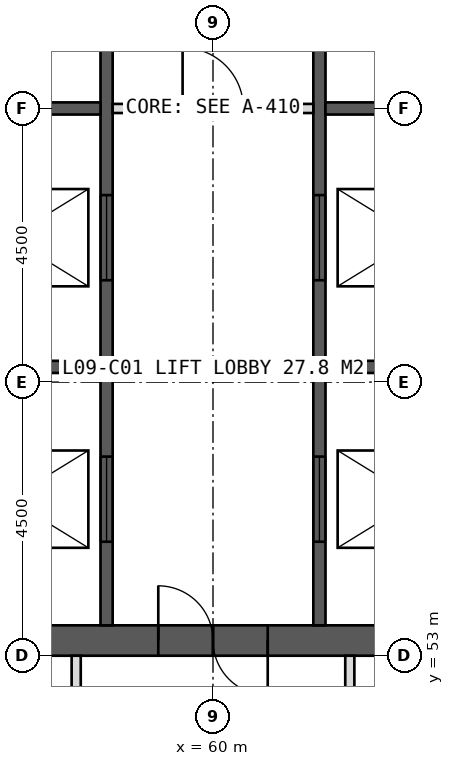
"""IFC4 building model, lengths in metres.
Left out: names, types, materials, properties, quantities, classifications, styles, units other than length and angle.
Written with IfcOpenShell. Run it as: python <this file> out.ifc"""

import sys

from ifc_helpers import new_model, si_unit, direction, frame, frame_2d, origin, place, context, subcontext, project, spatial, rectangle, extrude, element, fill, save


model = new_model("IFC4")
c1 = context("Model", 3, precision=1e-05, world=origin(), true_north=direction((0.0, 1.0)))
c2 = subcontext(c1, "Body", "Model", "MODEL_VIEW")
j1 = project(units=[si_unit("LENGTHUNIT", "METRE"), si_unit("PLANEANGLEUNIT", "RADIAN")], contexts=[c1])
p1 = place(None, origin())
s1 = spatial("IfcSite", under=j1, at=p1, CompositionType="ELEMENT")
p2 = place(p1, origin())
s2 = spatial("IfcBuilding", under=s1, at=p2, CompositionType="ELEMENT")
p3 = place(p2, frame((0.0, 0.0, 43.0)))
s3 = spatial("IfcBuildingStorey", under=s2, at=p3, CompositionType="ELEMENT", Elevation=43.0)
p4 = place(p3, frame((51.0, 53.25, 0.0), z_axis=(0.0, 0.0, 1.0), x_axis=(1.0, 0.0, 0.0)))
e1 = element("IfcWall", 1, at=p4, inside=s3, PredefinedType="SHEAR", context=c2, shape_type="SweptSolid", body=[
    extrude(rectangle(XDim=18.0, YDim=0.5, at=frame_2d((9.0, 0.0))), origin(), (0.0, 0.0, 1.0), 4.0),
])
p5 = place(p4, frame((8.1, 0.0, 0.0)))
e2 = element("IfcOpeningElement", 2, at=p5, cuts=e1, PredefinedType="OPENING", context=c2, shape_type="SweptSolid", body=[
    extrude(rectangle(XDim=1.8, YDim=2.2, at=frame_2d((0.9, 1.1))), frame((0.0, 0.26, 0.0), z_axis=(0.0, -1.0, 0.0), x_axis=(1.0, 0.0, 0.0)), (0.0, 0.0, 1.0), 0.52),
])
p6 = place(p3, frame((58.25, 53.5, 0.0), z_axis=(0.0, 0.0, 1.0), x_axis=(0.0, 1.0, 0.0)))
e3 = element("IfcWall", 3, at=p6, inside=s3, PredefinedType="SHEAR", context=c2, shape_type="SweptSolid", body=[
    extrude(rectangle(XDim=17.0, YDim=0.2, at=frame_2d((8.5, 0.0))), origin(), (0.0, 0.0, 1.0), 4.0),
])
p7 = place(p6, frame((1.375, 0.0, 0.0)))
e4 = element("IfcOpeningElement", 4, at=p7, cuts=e3, PredefinedType="OPENING", context=c2, shape_type="SweptSolid", body=[
    extrude(rectangle(XDim=1.4, YDim=2.2, at=frame_2d((0.7, 1.1))), frame((0.0, 0.11, 0.0), z_axis=(0.0, -1.0, 0.0), x_axis=(1.0, 0.0, 0.0)), (0.0, 0.0, 1.0), 0.22),
])
p8 = place(p6, frame((5.675, 0.0, 0.0)))
e5 = element("IfcOpeningElement", 5, at=p8, cuts=e3, PredefinedType="OPENING", context=c2, shape_type="SweptSolid", body=[
    extrude(rectangle(XDim=1.4, YDim=2.2, at=frame_2d((0.7, 1.1))), frame((0.0, 0.11, 0.0), z_axis=(0.0, -1.0, 0.0), x_axis=(1.0, 0.0, 0.0)), (0.0, 0.0, 1.0), 0.22),
])
p9 = place(p3, frame((61.75, 53.5, 0.0), z_axis=(0.0, 0.0, 1.0), x_axis=(0.0, 1.0, 0.0)))
e6 = element("IfcWall", 6, at=p9, inside=s3, PredefinedType="SHEAR", context=c2, shape_type="SweptSolid", body=[
    extrude(rectangle(XDim=17.0, YDim=0.2, at=frame_2d((8.5, 0.0))), origin(), (0.0, 0.0, 1.0), 4.0),
])
p10 = place(p9, frame((1.375, 0.0, 0.0)))
e7 = element("IfcOpeningElement", 7, at=p10, cuts=e6, PredefinedType="OPENING", context=c2, shape_type="SweptSolid", body=[
    extrude(rectangle(XDim=1.4, YDim=2.2, at=frame_2d((0.7, 1.1))), frame((0.0, 0.11, 0.0), z_axis=(0.0, -1.0, 0.0), x_axis=(1.0, 0.0, 0.0)), (0.0, 0.0, 1.0), 0.22),
])
p11 = place(p9, frame((5.675, 0.0, 0.0)))
e8 = element("IfcOpeningElement", 8, at=p11, cuts=e6, PredefinedType="OPENING", context=c2, shape_type="SweptSolid", body=[
    extrude(rectangle(XDim=1.4, YDim=2.2, at=frame_2d((0.7, 1.1))), frame((0.0, 0.11, 0.0), z_axis=(0.0, -1.0, 0.0), x_axis=(1.0, 0.0, 0.0)), (0.0, 0.0, 1.0), 0.22),
])
for number, where, z_axis, x_axis in (
    (9, (55.1, 57.75, 0.0), (0.0, 0.0, 1.0), (1.0, 0.0, 0.0)),
    (10, (61.85, 57.75, 0.0), (0.0, 0.0, 1.0), (1.0, 0.0, 0.0)),
    (11, (55.1, 62.0, 0.0), (0.0, 0.0, 1.0), (1.0, 0.0, 0.0)),
    (12, (61.85, 62.0, 0.0), (0.0, 0.0, 1.0), (1.0, 0.0, 0.0)),
):
    element("IfcWall", number, at=place(p3, frame(where, z_axis=z_axis, x_axis=x_axis)), inside=s3, PredefinedType="SHEAR", context=c2, shape_type="SweptSolid", body=[
        extrude(rectangle(XDim=3.05, YDim=0.2, at=frame_2d((1.525, 0.0))), origin(), (0.0, 0.0, 1.0), 4.0),
    ])
for number, where, z_axis, x_axis in (
    (13, (62.25, 53.0, 0.0), (0.0, 0.0, 1.0), (0.0, -1.0, 0.0)),
    (14, (57.75, 53.0, 0.0), (0.0, 0.0, 1.0), (0.0, -1.0, 0.0)),
):
    element("IfcWall", number, at=place(p3, frame(where, z_axis=z_axis, x_axis=x_axis)), inside=s3, PredefinedType="PARTITIONING", context=c2, shape_type="SweptSolid", body=[
        extrude(rectangle(XDim=6.6, YDim=0.15, at=frame_2d((3.3, 0.0))), origin(), (0.0, 0.0, 1.0), 3.75),
    ])
p12 = place(p3, frame((58.35, 62.0, 0.0), z_axis=(0.0, 0.0, 1.0), x_axis=(1.0, 0.0, 0.0)))
e15 = element("IfcWall", 15, at=p12, inside=s3, PredefinedType="PARTITIONING", context=c2, shape_type="SweptSolid", body=[
    extrude(rectangle(XDim=3.3, YDim=0.15, at=frame_2d((1.65, 0.0))), origin(), (0.0, 0.0, 1.0), 3.75),
])
p13 = place(p12, frame((1.15, 0.0, 0.0)))
e16 = element("IfcOpeningElement", 16, at=p13, cuts=e15, PredefinedType="OPENING", context=c2, shape_type="SweptSolid", body=[
    extrude(rectangle(XDim=1.0, YDim=2.1, at=frame_2d((0.5, 1.05))), frame((0.0, 0.085, 0.0), z_axis=(0.0, -1.0, 0.0), x_axis=(1.0, 0.0, 0.0)), (0.0, 0.0, 1.0), 0.17),
])
p14 = place(p5, origin())
e17 = element("IfcDoor", 17, at=p14, inside=s3, OperationType="DOUBLE_DOOR_SINGLE_SWING", PredefinedType="DOOR", context=c2, shape_type="SweptSolid", body=[
    extrude(rectangle(XDim=1.8, YDim=2.2, at=frame_2d((0.9, 1.1))), frame((0.0, 0.025, 0.0), z_axis=(0.0, -1.0, 0.0), x_axis=(1.0, 0.0, 0.0)), (0.0, 0.0, 1.0), 0.05),
])
fill(e2, e17)
p15 = place(p7, origin())
e18 = element("IfcDoor", 18, at=p15, inside=s3, OperationType="SLIDING_TO_LEFT", PredefinedType="DOOR", context=c2, shape_type="SweptSolid", body=[
    extrude(rectangle(XDim=1.4, YDim=2.2, at=frame_2d((0.7, 1.1))), frame((0.0, 0.025, 0.0), z_axis=(0.0, -1.0, 0.0), x_axis=(1.0, 0.0, 0.0)), (0.0, 0.0, 1.0), 0.05),
])
fill(e4, e18)
p16 = place(p10, origin())
e19 = element("IfcDoor", 19, at=p16, inside=s3, OperationType="SLIDING_TO_LEFT", PredefinedType="DOOR", context=c2, shape_type="SweptSolid", body=[
    extrude(rectangle(XDim=1.4, YDim=2.2, at=frame_2d((0.7, 1.1))), frame((0.0, 0.025, 0.0), z_axis=(0.0, -1.0, 0.0), x_axis=(1.0, 0.0, 0.0)), (0.0, 0.0, 1.0), 0.05),
])
fill(e7, e19)
p17 = place(p8, origin())
e20 = element("IfcDoor", 20, at=p17, inside=s3, OperationType="SLIDING_TO_LEFT", PredefinedType="DOOR", context=c2, shape_type="SweptSolid", body=[
    extrude(rectangle(XDim=1.4, YDim=2.2, at=frame_2d((0.7, 1.1))), frame((0.0, 0.025, 0.0), z_axis=(0.0, -1.0, 0.0), x_axis=(1.0, 0.0, 0.0)), (0.0, 0.0, 1.0), 0.05),
])
fill(e5, e20)
p18 = place(p11, origin())
e21 = element("IfcDoor", 21, at=p18, inside=s3, OperationType="SLIDING_TO_LEFT", PredefinedType="DOOR", context=c2, shape_type="SweptSolid", body=[
    extrude(rectangle(XDim=1.4, YDim=2.2, at=frame_2d((0.7, 1.1))), frame((0.0, 0.025, 0.0), z_axis=(0.0, -1.0, 0.0), x_axis=(1.0, 0.0, 0.0)), (0.0, 0.0, 1.0), 0.05),
])
fill(e8, e21)
p19 = place(p13, origin())
e22 = element("IfcDoor", 22, at=p19, inside=s3, OperationType="SINGLE_SWING_LEFT", PredefinedType="DOOR", context=c2, shape_type="SweptSolid", body=[
    extrude(rectangle(XDim=1.0, YDim=2.1, at=frame_2d((0.5, 1.05))), frame((0.0, 0.025, 0.0), z_axis=(0.0, -1.0, 0.0), x_axis=(1.0, 0.0, 0.0)), (0.0, 0.0, 1.0), 0.05),
])
fill(e16, e22)
save(model, sys.argv[1])
